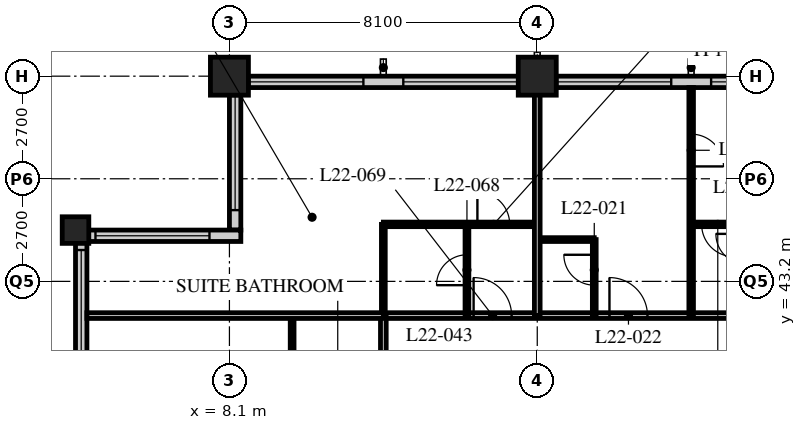
"""IFC4 building model, lengths in metres.
Left out: names, types, materials, properties, quantities, classifications, styles, units other than length and angle.
Written with IfcOpenShell. Run it as: python <this file> out.ifc"""

import sys

from ifc_helpers import new_model, si_unit, direction, frame, frame_2d, origin, origin_2d, place, context, subcontext, project, spatial, rectangle, hollow_rectangle, extrude, element, fill, save


model = new_model("IFC4")
c1 = context("Model", 3, precision=1e-05, world=origin(), true_north=direction((0.0, 1.0)))
c2 = subcontext(c1, "Body", "Model", "MODEL_VIEW")
j1 = project(units=[si_unit("LENGTHUNIT", "METRE"), si_unit("PLANEANGLEUNIT", "RADIAN")], contexts=[c1])
p1 = place(None, origin())
s1 = spatial("IfcSite", under=j1, at=p1, CompositionType="ELEMENT")
p2 = place(p1, origin())
s2 = spatial("IfcBuilding", under=s1, at=p2, CompositionType="ELEMENT")
p3 = place(p2, frame((0.0, 0.0, 87.4)))
s3 = spatial("IfcBuildingStorey", under=s2, at=p3, CompositionType="ELEMENT", Elevation=87.4)
p4 = place(p3, frame((4.05, 44.55, 0.0), z_axis=(0.0, 0.0, 1.0), x_axis=(1.0, 0.0, 0.0)))
e1 = element("IfcColumn", 1, at=p4, inside=s3, PredefinedType="COLUMN", context=c2, shape_type="SweptSolid", body=[
    extrude(hollow_rectangle(XDim=0.7, YDim=0.7, WallThickness=0.07, at=origin_2d()), origin(), (0.0, 0.0, 1.0), 3.4),
])
for number, where, z_axis, x_axis in (
    (2, (8.1, 48.6, 0.0), (0.0, 0.0, 1.0), (1.0, 0.0, 0.0)),
    (3, (16.2, 48.6, 0.0), (0.0, 0.0, 1.0), (1.0, 0.0, 0.0)),
):
    element("IfcColumn", number, at=place(p3, frame(where, z_axis=z_axis, x_axis=x_axis)), inside=s3, PredefinedType="COLUMN", context=c2, shape_type="SweptSolid", body=[
        extrude(hollow_rectangle(XDim=1.0, YDim=1.0, WallThickness=0.1, at=origin_2d()), origin(), (0.0, 0.0, 1.0), 3.4),
    ])
p5 = place(p3, frame((48.3, 48.45, 0.0), z_axis=(0.0, 0.0, 1.0), x_axis=(-1.0, 0.0, 0.0)))
e4 = element("IfcWall", 4, at=p5, inside=s3, PredefinedType="SOLIDWALL", context=c2, shape_type="SweptSolid", body=[
    extrude(rectangle(XDim=40.2, YDim=0.3, at=frame_2d((20.1, 0.0))), origin(), (0.0, 0.0, 1.0), 2.05),
])
p6 = place(p5, frame((0.225, 0.0, 0.9)))
e5 = element("IfcOpeningElement", 5, at=p6, cuts=e4, PredefinedType="OPENING", context=c2, shape_type="SweptSolid", body=[
    extrude(rectangle(XDim=3.0, YDim=1.1, at=frame_2d((1.5, 0.55))), frame((0.0, 0.16, 0.0), z_axis=(0.0, -1.0, 0.0), x_axis=(1.0, 0.0, 0.0)), (0.0, 0.0, 1.0), 0.32),
])
p7 = place(p5, frame((4.275, 0.0, 0.9)))
e6 = element("IfcOpeningElement", 6, at=p7, cuts=e4, PredefinedType="OPENING", context=c2, shape_type="SweptSolid", body=[
    extrude(rectangle(XDim=3.0, YDim=1.1, at=frame_2d((1.5, 0.55))), frame((0.0, 0.16, 0.0), z_axis=(0.0, -1.0, 0.0), x_axis=(1.0, 0.0, 0.0)), (0.0, 0.0, 1.0), 0.32),
])
p8 = place(p5, frame((8.325, 0.0, 0.9)))
e7 = element("IfcOpeningElement", 7, at=p8, cuts=e4, PredefinedType="OPENING", context=c2, shape_type="SweptSolid", body=[
    extrude(rectangle(XDim=3.0, YDim=1.1, at=frame_2d((1.5, 0.55))), frame((0.0, 0.16, 0.0), z_axis=(0.0, -1.0, 0.0), x_axis=(1.0, 0.0, 0.0)), (0.0, 0.0, 1.0), 0.32),
])
p9 = place(p5, frame((12.375, 0.0, 0.9)))
e8 = element("IfcOpeningElement", 8, at=p9, cuts=e4, PredefinedType="OPENING", context=c2, shape_type="SweptSolid", body=[
    extrude(rectangle(XDim=3.0, YDim=1.1, at=frame_2d((1.5, 0.55))), frame((0.0, 0.16, 0.0), z_axis=(0.0, -1.0, 0.0), x_axis=(1.0, 0.0, 0.0)), (0.0, 0.0, 1.0), 0.32),
])
p10 = place(p5, frame((16.425, 0.0, 0.9)))
e9 = element("IfcOpeningElement", 9, at=p10, cuts=e4, PredefinedType="OPENING", context=c2, shape_type="SweptSolid", body=[
    extrude(rectangle(XDim=3.0, YDim=1.1, at=frame_2d((1.5, 0.55))), frame((0.0, 0.16, 0.0), z_axis=(0.0, -1.0, 0.0), x_axis=(1.0, 0.0, 0.0)), (0.0, 0.0, 1.0), 0.32),
])
p11 = place(p5, frame((20.475, 0.0, 0.9)))
e10 = element("IfcOpeningElement", 10, at=p11, cuts=e4, PredefinedType="OPENING", context=c2, shape_type="SweptSolid", body=[
    extrude(rectangle(XDim=3.0, YDim=1.1, at=frame_2d((1.5, 0.55))), frame((0.0, 0.16, 0.0), z_axis=(0.0, -1.0, 0.0), x_axis=(1.0, 0.0, 0.0)), (0.0, 0.0, 1.0), 0.32),
])
p12 = place(p5, frame((24.525, 0.0, 0.9)))
e11 = element("IfcOpeningElement", 11, at=p12, cuts=e4, PredefinedType="OPENING", context=c2, shape_type="SweptSolid", body=[
    extrude(rectangle(XDim=3.0, YDim=1.1, at=frame_2d((1.5, 0.55))), frame((0.0, 0.16, 0.0), z_axis=(0.0, -1.0, 0.0), x_axis=(1.0, 0.0, 0.0)), (0.0, 0.0, 1.0), 0.32),
])
p13 = place(p5, frame((28.575, 0.0, 0.9)))
e12 = element("IfcOpeningElement", 12, at=p13, cuts=e4, PredefinedType="OPENING", context=c2, shape_type="SweptSolid", body=[
    extrude(rectangle(XDim=3.0, YDim=1.1, at=frame_2d((1.5, 0.55))), frame((0.0, 0.16, 0.0), z_axis=(0.0, -1.0, 0.0), x_axis=(1.0, 0.0, 0.0)), (0.0, 0.0, 1.0), 0.32),
])
p14 = place(p5, frame((32.625, 0.0, 0.9)))
e13 = element("IfcOpeningElement", 13, at=p14, cuts=e4, PredefinedType="OPENING", context=c2, shape_type="SweptSolid", body=[
    extrude(rectangle(XDim=3.0, YDim=1.1, at=frame_2d((1.5, 0.55))), frame((0.0, 0.16, 0.0), z_axis=(0.0, -1.0, 0.0), x_axis=(1.0, 0.0, 0.0)), (0.0, 0.0, 1.0), 0.32),
])
p15 = place(p5, frame((36.675, 0.0, 0.9)))
e14 = element("IfcOpeningElement", 14, at=p15, cuts=e4, PredefinedType="OPENING", context=c2, shape_type="SweptSolid", body=[
    extrude(rectangle(XDim=3.0, YDim=1.1, at=frame_2d((1.5, 0.55))), frame((0.0, 0.16, 0.0), z_axis=(0.0, -1.0, 0.0), x_axis=(1.0, 0.0, 0.0)), (0.0, 0.0, 1.0), 0.32),
])
p16 = place(p3, frame((8.25, 48.3, 0.0), z_axis=(0.0, 0.0, 1.0), x_axis=(0.0, -1.0, 0.0)))
e15 = element("IfcWall", 15, at=p16, inside=s3, PredefinedType="SOLIDWALL", context=c2, shape_type="SweptSolid", body=[
    extrude(rectangle(XDim=3.75, YDim=0.3, at=frame_2d((1.875, 0.0))), origin(), (0.0, 0.0, 1.0), 2.05),
])
p17 = place(p16, frame((0.225, 0.0, 0.9)))
e16 = element("IfcOpeningElement", 16, at=p17, cuts=e15, PredefinedType="OPENING", context=c2, shape_type="SweptSolid", body=[
    extrude(rectangle(XDim=3.0, YDim=1.1, at=frame_2d((1.5, 0.55))), frame((0.0, 0.16, 0.0), z_axis=(0.0, -1.0, 0.0), x_axis=(1.0, 0.0, 0.0)), (0.0, 0.0, 1.0), 0.32),
])
p18 = place(p3, frame((8.4, 44.4, 0.0), z_axis=(0.0, 0.0, 1.0), x_axis=(-1.0, 0.0, 0.0)))
e17 = element("IfcWall", 17, at=p18, inside=s3, PredefinedType="SOLIDWALL", context=c2, shape_type="SweptSolid", body=[
    extrude(rectangle(XDim=4.35, YDim=0.3, at=frame_2d((2.175, 0.0))), origin(), (0.0, 0.0, 1.0), 2.45),
])
p19 = place(p18, frame((0.825, 0.0, 0.9)))
e18 = element("IfcOpeningElement", 18, at=p19, cuts=e17, PredefinedType="OPENING", context=c2, shape_type="SweptSolid", body=[
    extrude(rectangle(XDim=3.0, YDim=1.1, at=frame_2d((1.5, 0.55))), frame((0.0, 0.16, 0.0), z_axis=(0.0, -1.0, 0.0), x_axis=(1.0, 0.0, 0.0)), (0.0, 0.0, 1.0), 0.32),
])
p20 = place(p3, frame((4.2, 44.25, 0.0), z_axis=(0.0, 0.0, 1.0), x_axis=(0.0, -1.0, 0.0)))
e19 = element("IfcWall", 19, at=p20, inside=s3, PredefinedType="SOLIDWALL", context=c2, shape_type="SweptSolid", body=[
    extrude(rectangle(XDim=3.75, YDim=0.3, at=frame_2d((1.875, 0.0))), origin(), (0.0, 0.0, 1.0), 2.45),
])
p21 = place(p20, frame((0.225, 0.0, 0.9)))
e20 = element("IfcOpeningElement", 20, at=p21, cuts=e19, PredefinedType="OPENING", context=c2, shape_type="SweptSolid", body=[
    extrude(rectangle(XDim=3.0, YDim=1.1, at=frame_2d((1.5, 0.55))), frame((0.0, 0.16, 0.0), z_axis=(0.0, -1.0, 0.0), x_axis=(1.0, 0.0, 0.0)), (0.0, 0.0, 1.0), 0.32),
])
p22 = place(p3, frame((12.15, 42.3, 0.0), z_axis=(0.0, 0.0, 1.0), x_axis=(1.0, 0.0, 0.0)))
e21 = element("IfcWall", 21, at=p22, inside=s3, PredefinedType="PARTITIONING", context=c2, shape_type="SweptSolid", body=[
    extrude(rectangle(XDim=32.4, YDim=0.15, at=frame_2d((16.2, 0.0))), origin(), (0.0, 0.0, 1.0), 3.15),
])
p23 = place(p22, frame((5.95, 0.0, 0.0)))
e22 = element("IfcOpeningElement", 22, at=p23, cuts=e21, PredefinedType="OPENING", context=c2, shape_type="SweptSolid", body=[
    extrude(rectangle(XDim=1.0, YDim=2.1, at=frame_2d((0.5, 1.05))), frame((0.0, 0.085, 0.0), z_axis=(0.0, -1.0, 0.0), x_axis=(1.0, 0.0, 0.0)), (0.0, 0.0, 1.0), 0.17),
])
p24 = place(p22, frame((14.6, 0.0, 0.0)))
e23 = element("IfcOpeningElement", 23, at=p24, cuts=e21, PredefinedType="OPENING", context=c2, shape_type="SweptSolid", body=[
    extrude(rectangle(XDim=1.0, YDim=2.1, at=frame_2d((0.5, 1.05))), frame((0.0, 0.085, 0.0), z_axis=(0.0, -1.0, 0.0), x_axis=(1.0, 0.0, 0.0)), (0.0, 0.0, 1.0), 0.17),
])
p25 = place(p22, frame((18.65, 0.0, 0.0)))
e24 = element("IfcOpeningElement", 24, at=p25, cuts=e21, PredefinedType="OPENING", context=c2, shape_type="SweptSolid", body=[
    extrude(rectangle(XDim=1.0, YDim=2.1, at=frame_2d((0.5, 1.05))), frame((0.0, 0.085, 0.0), z_axis=(0.0, -1.0, 0.0), x_axis=(1.0, 0.0, 0.0)), (0.0, 0.0, 1.0), 0.17),
])
p26 = place(p22, frame((22.15, 0.0, 0.0)))
e25 = element("IfcOpeningElement", 25, at=p26, cuts=e21, PredefinedType="OPENING", context=c2, shape_type="SweptSolid", body=[
    extrude(rectangle(XDim=1.0, YDim=2.1, at=frame_2d((0.5, 1.05))), frame((0.0, 0.085, 0.0), z_axis=(0.0, -1.0, 0.0), x_axis=(1.0, 0.0, 0.0)), (0.0, 0.0, 1.0), 0.17),
])
p27 = place(p22, frame((29.025, 0.0, 0.0)))
e26 = element("IfcOpeningElement", 26, at=p27, cuts=e21, PredefinedType="OPENING", context=c2, shape_type="SweptSolid", body=[
    extrude(rectangle(XDim=1.0, YDim=2.1, at=frame_2d((0.5, 1.05))), frame((0.0, 0.085, 0.0), z_axis=(0.0, -1.0, 0.0), x_axis=(1.0, 0.0, 0.0)), (0.0, 0.0, 1.0), 0.17),
])
p28 = place(p22, frame((2.375, 0.0, 0.0)))
e27 = element("IfcOpeningElement", 27, at=p28, cuts=e21, PredefinedType="OPENING", context=c2, shape_type="SweptSolid", body=[
    extrude(rectangle(XDim=1.0, YDim=2.1, at=frame_2d((0.5, 1.05))), frame((0.0, 0.085, 0.0), z_axis=(0.0, -1.0, 0.0), x_axis=(1.0, 0.0, 0.0)), (0.0, 0.0, 1.0), 0.17),
])
p29 = place(p3, frame((12.15, 16.2, 0.0), z_axis=(0.0, 0.0, 1.0), x_axis=(0.0, 1.0, 0.0)))
e28 = element("IfcWall", 28, at=p29, inside=s3, PredefinedType="PARTITIONING", context=c2, shape_type="SweptSolid", body=[
    extrude(rectangle(XDim=26.1, YDim=0.15, at=frame_2d((13.05, 0.0))), origin(), (0.0, 0.0, 1.0), 3.15),
])
p30 = place(p29, frame((2.45, 0.0, 0.0)))
e29 = element("IfcOpeningElement", 29, at=p30, cuts=e28, PredefinedType="OPENING", context=c2, shape_type="SweptSolid", body=[
    extrude(rectangle(XDim=1.0, YDim=2.1, at=frame_2d((0.5, 1.05))), frame((0.0, 0.085, 0.0), z_axis=(0.0, -1.0, 0.0), x_axis=(1.0, 0.0, 0.0)), (0.0, 0.0, 1.0), 0.17),
])
p31 = place(p29, frame((6.5, 0.0, 0.0)))
e30 = element("IfcOpeningElement", 30, at=p31, cuts=e28, PredefinedType="OPENING", context=c2, shape_type="SweptSolid", body=[
    extrude(rectangle(XDim=1.0, YDim=2.1, at=frame_2d((0.5, 1.05))), frame((0.0, 0.085, 0.0), z_axis=(0.0, -1.0, 0.0), x_axis=(1.0, 0.0, 0.0)), (0.0, 0.0, 1.0), 0.17),
])
p32 = place(p29, frame((10.0, 0.0, 0.0)))
e31 = element("IfcOpeningElement", 31, at=p32, cuts=e28, PredefinedType="OPENING", context=c2, shape_type="SweptSolid", body=[
    extrude(rectangle(XDim=1.0, YDim=2.1, at=frame_2d((0.5, 1.05))), frame((0.0, 0.085, 0.0), z_axis=(0.0, -1.0, 0.0), x_axis=(1.0, 0.0, 0.0)), (0.0, 0.0, 1.0), 0.17),
])
p33 = place(p29, frame((18.1, 0.0, 0.0)))
e32 = element("IfcOpeningElement", 32, at=p33, cuts=e28, PredefinedType="OPENING", context=c2, shape_type="SweptSolid", body=[
    extrude(rectangle(XDim=1.0, YDim=2.1, at=frame_2d((0.5, 1.05))), frame((0.0, 0.085, 0.0), z_axis=(0.0, -1.0, 0.0), x_axis=(1.0, 0.0, 0.0)), (0.0, 0.0, 1.0), 0.17),
])
p34 = place(p3, frame((16.2, 44.3, 0.0), z_axis=(0.0, 0.0, 1.0), x_axis=(1.0, 0.0, 0.0)))
e33 = element("IfcWall", 33, at=p34, inside=s3, PredefinedType="PARTITIONING", context=c2, shape_type="SweptSolid", body=[
    extrude(rectangle(XDim=1.5, YDim=0.1, at=frame_2d((0.75, 0.0))), origin(), (0.0, 0.0, 1.0), 3.15),
])
p35 = place(p3, frame((17.7, 42.3, 0.0), z_axis=(0.0, 0.0, 1.0), x_axis=(0.0, 1.0, 0.0)))
e34 = element("IfcWall", 34, at=p35, inside=s3, PredefinedType="PARTITIONING", context=c2, shape_type="SweptSolid", body=[
    extrude(rectangle(XDim=2.0, YDim=0.1, at=frame_2d((1.0, 0.0))), origin(), (0.0, 0.0, 1.0), 3.15),
])
p36 = place(p35, frame((0.8, 0.0, 0.0)))
e35 = element("IfcOpeningElement", 35, at=p36, cuts=e34, PredefinedType="OPENING", context=c2, shape_type="SweptSolid", body=[
    extrude(rectangle(XDim=0.8, YDim=2.1, at=frame_2d((0.4, 1.05))), frame((0.0, 0.06, 0.0), z_axis=(0.0, -1.0, 0.0), x_axis=(1.0, 0.0, 0.0)), (0.0, 0.0, 1.0), 0.12),
])
p37 = place(p3, frame((20.25, 42.3, 0.0), z_axis=(0.0, 0.0, 1.0), x_axis=(0.0, 1.0, 0.0)))
e36 = element("IfcWall", 36, at=p37, inside=s3, PredefinedType="PARTITIONING", context=c2, shape_type="SweptSolid", body=[
    extrude(rectangle(XDim=6.0, YDim=0.12, at=frame_2d((3.0, 0.0))), origin(), (0.0, 0.0, 1.0), 3.15),
])
p38 = place(p37, frame((3.925, 0.0, 0.0)))
e37 = element("IfcOpeningElement", 37, at=p38, cuts=e36, PredefinedType="OPENING", context=c2, shape_type="SweptSolid", body=[
    extrude(rectangle(XDim=0.85, YDim=2.1, at=frame_2d((0.425, 1.05))), frame((0.0, 0.07, 0.0), z_axis=(0.0, -1.0, 0.0), x_axis=(1.0, 0.0, 0.0)), (0.0, 0.0, 1.0), 0.14),
])
p39 = place(p3, frame((9.75, 39.7, 0.0), z_axis=(0.0, 0.0, 1.0), x_axis=(0.0, 1.0, 0.0)))
e38 = element("IfcWall", 38, at=p39, inside=s3, PredefinedType="PARTITIONING", context=c2, shape_type="SweptSolid", body=[
    extrude(rectangle(XDim=2.6, YDim=0.1, at=frame_2d((1.3, 0.0))), origin(), (0.0, 0.0, 1.0), 3.15),
])
p40 = place(p3, frame((12.15, 44.7, 0.0), z_axis=(0.0, 0.0, 1.0), x_axis=(1.0, 0.0, 0.0)))
e39 = element("IfcWall", 39, at=p40, inside=s3, PredefinedType="PARTITIONING", context=c2, shape_type="SweptSolid", body=[
    extrude(rectangle(XDim=4.05, YDim=0.12, at=frame_2d((2.025, 0.0))), origin(), (0.0, 0.0, 1.0), 3.15),
])
p41 = place(p40, frame((2.475, 0.0, 0.0)))
e40 = element("IfcOpeningElement", 40, at=p41, cuts=e39, PredefinedType="OPENING", context=c2, shape_type="SweptSolid", body=[
    extrude(rectangle(XDim=0.85, YDim=2.1, at=frame_2d((0.425, 1.05))), frame((0.0, 0.07, 0.0), z_axis=(0.0, -1.0, 0.0), x_axis=(1.0, 0.0, 0.0)), (0.0, 0.0, 1.0), 0.14),
])
p42 = place(p3, frame((14.35, 42.3, 0.0), z_axis=(0.0, 0.0, 1.0), x_axis=(0.0, 1.0, 0.0)))
e41 = element("IfcWall", 41, at=p42, inside=s3, PredefinedType="PARTITIONING", context=c2, shape_type="SweptSolid", body=[
    extrude(rectangle(XDim=2.4, YDim=0.1, at=frame_2d((1.2, 0.0))), origin(), (0.0, 0.0, 1.0), 3.15),
])
p43 = place(p42, frame((0.8, 0.0, 0.0)))
e42 = element("IfcOpeningElement", 42, at=p43, cuts=e41, PredefinedType="OPENING", context=c2, shape_type="SweptSolid", body=[
    extrude(rectangle(XDim=0.8, YDim=2.1, at=frame_2d((0.4, 1.05))), frame((0.0, 0.06, 0.0), z_axis=(0.0, -1.0, 0.0), x_axis=(1.0, 0.0, 0.0)), (0.0, 0.0, 1.0), 0.12),
])
p44 = place(p3, frame((12.15, 42.3, 0.0), z_axis=(0.0, 0.0, 1.0), x_axis=(0.0, 1.0, 0.0)))
e43 = element("IfcWall", 43, at=p44, inside=s3, PredefinedType="PARTITIONING", context=c2, shape_type="SweptSolid", body=[
    extrude(rectangle(XDim=2.4, YDim=0.1, at=frame_2d((1.2, 0.0))), origin(), (0.0, 0.0, 1.0), 3.15),
])
p45 = place(p3, frame((4.35, 42.3, 0.0), z_axis=(0.0, 0.0, 1.0), x_axis=(1.0, 0.0, 0.0)))
e44 = element("IfcWall", 44, at=p45, inside=s3, PredefinedType="PARTITIONING", context=c2, shape_type="SweptSolid", body=[
    extrude(rectangle(XDim=7.8, YDim=0.15, at=frame_2d((3.9, 0.0))), origin(), (0.0, 0.0, 1.0), 3.15),
])
p46 = place(p3, frame((16.2, 42.3, 0.0), z_axis=(0.0, 0.0, 1.0), x_axis=(0.0, 1.0, 0.0)))
e45 = element("IfcWall", 45, at=p46, inside=s3, PredefinedType="PARTITIONING", context=c2, shape_type="SweptSolid", body=[
    extrude(rectangle(XDim=6.0, YDim=0.15, at=frame_2d((3.0, 0.0))), origin(), (0.0, 0.0, 1.0), 2.05),
])
p47 = place(p3, frame((20.25, 44.7, 0.0), z_axis=(0.0, 0.0, 1.0), x_axis=(1.0, 0.0, 0.0)))
e46 = element("IfcWall", 46, at=p47, inside=s3, PredefinedType="PARTITIONING", context=c2, shape_type="SweptSolid", body=[
    extrude(rectangle(XDim=1.46, YDim=0.12, at=frame_2d((0.73, 0.0))), origin(), (0.0, 0.0, 1.0), 3.15),
])
p48 = place(p47, frame((0.275, 0.0, 0.0)))
e47 = element("IfcOpeningElement", 47, at=p48, cuts=e46, PredefinedType="OPENING", context=c2, shape_type="SweptSolid", body=[
    extrude(rectangle(XDim=0.85, YDim=2.1, at=frame_2d((0.425, 1.05))), frame((0.0, 0.07, 0.0), z_axis=(0.0, -1.0, 0.0), x_axis=(1.0, 0.0, 0.0)), (0.0, 0.0, 1.0), 0.14),
])
p49 = place(p12, origin())
e48 = element("IfcWindow", 48, at=p49, inside=s3, PartitioningType="SINGLE_PANEL", PredefinedType="WINDOW", context=c2, shape_type="SweptSolid", body=[
    extrude(rectangle(XDim=3.0, YDim=1.1, at=frame_2d((1.5, 0.55))), frame((0.0, 0.03, 0.0), z_axis=(0.0, -1.0, 0.0), x_axis=(1.0, 0.0, 0.0)), (0.0, 0.0, 1.0), 0.06),
])
fill(e11, e48)
p50 = place(p13, origin())
e49 = element("IfcWindow", 49, at=p50, inside=s3, PartitioningType="SINGLE_PANEL", PredefinedType="WINDOW", context=c2, shape_type="SweptSolid", body=[
    extrude(rectangle(XDim=3.0, YDim=1.1, at=frame_2d((1.5, 0.55))), frame((0.0, 0.03, 0.0), z_axis=(0.0, -1.0, 0.0), x_axis=(1.0, 0.0, 0.0)), (0.0, 0.0, 1.0), 0.06),
])
fill(e12, e49)
p51 = place(p14, origin())
e50 = element("IfcWindow", 50, at=p51, inside=s3, PartitioningType="SINGLE_PANEL", PredefinedType="WINDOW", context=c2, shape_type="SweptSolid", body=[
    extrude(rectangle(XDim=3.0, YDim=1.1, at=frame_2d((1.5, 0.55))), frame((0.0, 0.03, 0.0), z_axis=(0.0, -1.0, 0.0), x_axis=(1.0, 0.0, 0.0)), (0.0, 0.0, 1.0), 0.06),
])
fill(e13, e50)
p52 = place(p15, origin())
e51 = element("IfcWindow", 51, at=p52, inside=s3, PartitioningType="SINGLE_PANEL", PredefinedType="WINDOW", context=c2, shape_type="SweptSolid", body=[
    extrude(rectangle(XDim=3.0, YDim=1.1, at=frame_2d((1.5, 0.55))), frame((0.0, 0.03, 0.0), z_axis=(0.0, -1.0, 0.0), x_axis=(1.0, 0.0, 0.0)), (0.0, 0.0, 1.0), 0.06),
])
fill(e14, e51)
p53 = place(p17, origin())
e52 = element("IfcWindow", 52, at=p53, inside=s3, PartitioningType="SINGLE_PANEL", PredefinedType="WINDOW", context=c2, shape_type="SweptSolid", body=[
    extrude(rectangle(XDim=3.0, YDim=1.1, at=frame_2d((1.5, 0.55))), frame((0.0, 0.03, 0.0), z_axis=(0.0, -1.0, 0.0), x_axis=(1.0, 0.0, 0.0)), (0.0, 0.0, 1.0), 0.06),
])
fill(e16, e52)
p54 = place(p19, origin())
e53 = element("IfcWindow", 53, at=p54, inside=s3, PartitioningType="SINGLE_PANEL", PredefinedType="WINDOW", context=c2, shape_type="SweptSolid", body=[
    extrude(rectangle(XDim=3.0, YDim=1.1, at=frame_2d((1.5, 0.55))), frame((0.0, 0.03, 0.0), z_axis=(0.0, -1.0, 0.0), x_axis=(1.0, 0.0, 0.0)), (0.0, 0.0, 1.0), 0.06),
])
fill(e18, e53)
p55 = place(p21, origin())
e54 = element("IfcWindow", 54, at=p55, inside=s3, PartitioningType="SINGLE_PANEL", PredefinedType="WINDOW", context=c2, shape_type="SweptSolid", body=[
    extrude(rectangle(XDim=3.0, YDim=1.1, at=frame_2d((1.5, 0.55))), frame((0.0, 0.03, 0.0), z_axis=(0.0, -1.0, 0.0), x_axis=(1.0, 0.0, 0.0)), (0.0, 0.0, 1.0), 0.06),
])
fill(e20, e54)
p56 = place(p36, origin())
e55 = element("IfcDoor", 55, at=p56, inside=s3, OperationType="SINGLE_SWING_RIGHT", PredefinedType="DOOR", context=c2, shape_type="SweptSolid", body=[
    extrude(rectangle(XDim=0.8, YDim=2.1, at=frame_2d((0.4, 1.05))), frame((0.0, 0.025, 0.0), z_axis=(0.0, -1.0, 0.0), x_axis=(1.0, 0.0, 0.0)), (0.0, 0.0, 1.0), 0.05),
])
fill(e35, e55)
p57 = place(p23, origin())
e56 = element("IfcDoor", 56, at=p57, inside=s3, OperationType="SINGLE_SWING_LEFT", PredefinedType="DOOR", context=c2, shape_type="SweptSolid", body=[
    extrude(rectangle(XDim=1.0, YDim=2.1, at=frame_2d((0.5, 1.05))), frame((0.0, 0.025, 0.0), z_axis=(0.0, -1.0, 0.0), x_axis=(1.0, 0.0, 0.0)), (0.0, 0.0, 1.0), 0.05),
])
fill(e22, e56)
p58 = place(p38, origin())
e57 = element("IfcDoor", 57, at=p58, inside=s3, OperationType="SINGLE_SWING_RIGHT", PredefinedType="DOOR", context=c2, shape_type="SweptSolid", body=[
    extrude(rectangle(XDim=0.85, YDim=2.1, at=frame_2d((0.425, 1.05))), frame((0.0, 0.025, 0.0), z_axis=(0.0, -1.0, 0.0), x_axis=(1.0, 0.0, 0.0)), (0.0, 0.0, 1.0), 0.05),
])
fill(e37, e57)
p59 = place(p43, origin())
e58 = element("IfcDoor", 58, at=p59, inside=s3, OperationType="SINGLE_SWING_LEFT", PredefinedType="DOOR", context=c2, shape_type="SweptSolid", body=[
    extrude(rectangle(XDim=0.8, YDim=2.1, at=frame_2d((0.4, 1.05))), frame((0.0, 0.025, 0.0), z_axis=(0.0, -1.0, 0.0), x_axis=(1.0, 0.0, 0.0)), (0.0, 0.0, 1.0), 0.05),
])
fill(e42, e58)
p60 = place(p28, origin())
e59 = element("IfcDoor", 59, at=p60, inside=s3, OperationType="SINGLE_SWING_LEFT", PredefinedType="DOOR", context=c2, shape_type="SweptSolid", body=[
    extrude(rectangle(XDim=1.0, YDim=2.1, at=frame_2d((0.5, 1.05))), frame((0.0, 0.025, 0.0), z_axis=(0.0, -1.0, 0.0), x_axis=(1.0, 0.0, 0.0)), (0.0, 0.0, 1.0), 0.05),
])
fill(e27, e59)
p61 = place(p41, origin())
e60 = element("IfcDoor", 60, at=p61, inside=s3, OperationType="SINGLE_SWING_LEFT", PredefinedType="DOOR", context=c2, shape_type="SweptSolid", body=[
    extrude(rectangle(XDim=0.85, YDim=2.1, at=frame_2d((0.425, 1.05))), frame((0.0, 0.025, 0.0), z_axis=(0.0, -1.0, 0.0), x_axis=(1.0, 0.0, 0.0)), (0.0, 0.0, 1.0), 0.05),
])
fill(e40, e60)
p62 = place(p48, origin())
e61 = element("IfcDoor", 61, at=p62, inside=s3, OperationType="SINGLE_SWING_LEFT", PredefinedType="DOOR", context=c2, shape_type="SweptSolid", body=[
    extrude(rectangle(XDim=0.85, YDim=2.1, at=frame_2d((0.425, 1.05))), frame((0.0, 0.025, 0.0), z_axis=(0.0, -1.0, 0.0), x_axis=(1.0, 0.0, 0.0)), (0.0, 0.0, 1.0), 0.05),
])
fill(e47, e61)
save(model, sys.argv[1])
